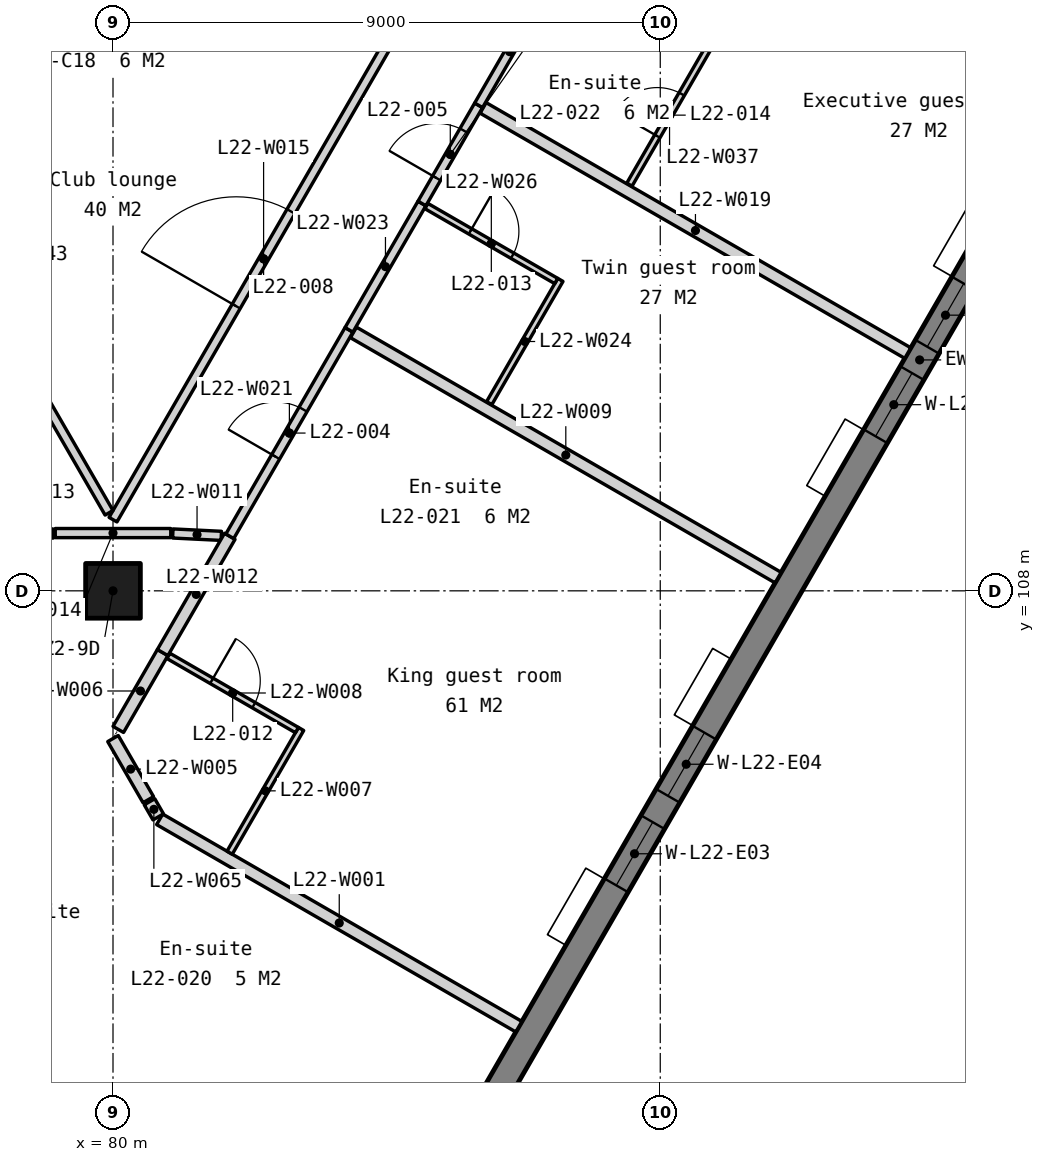
"""IFC4 building model, lengths in metres.
Left out: names, types, materials, properties, quantities, classifications, styles, units other than length and angle.
Written with IfcOpenShell. Run it as: python <this file> out.ifc"""

import sys

from ifc_helpers import new_model, si_unit, direction, frame, frame_2d, origin, origin_2d, place, context, subcontext, project, spatial, polyline, rectangle, outline, extrude, element, fill, save


model = new_model("IFC4")
c1 = context("Model", 3, precision=1e-05, world=origin(), true_north=direction((0.0, 1.0)))
c2 = subcontext(c1, "Body", "Model", "MODEL_VIEW")
j1 = project(units=[si_unit("LENGTHUNIT", "METRE"), si_unit("PLANEANGLEUNIT", "RADIAN")], contexts=[c1])
p1 = place(None, origin())
s1 = spatial("IfcSite", under=j1, at=p1, CompositionType="ELEMENT")
p2 = place(p1, origin())
s2 = spatial("IfcBuilding", under=s1, at=p2, CompositionType="ELEMENT")
p3 = place(p2, frame((0.0, 0.0, 92.3)))
s3 = spatial("IfcBuildingStorey", under=s2, at=p3, CompositionType="ELEMENT", Elevation=92.3)
p4 = place(p3, frame((80.0, 108.0, 0.0), z_axis=(0.0, 0.0, 1.0), x_axis=(1.0, 0.0, 0.0)))
e1 = element("IfcColumn", 1, at=p4, inside=s3, PredefinedType="COLUMN", context=c2, shape_type="SweptSolid", body=[
    extrude(rectangle(XDim=0.9, YDim=0.9, at=origin_2d()), origin(), (0.0, 0.0, 1.0), 3.5),
])
p5 = place(p3, frame((82.605, 93.333, -0.15), z_axis=(0.0, 0.0, 1.0), x_axis=(0.500000478905, 0.866025127289, 0.0)))
e2 = element("IfcWall", 2, at=p5, inside=s3, PredefinedType="SOLIDWALL", context=c2, shape_type="SweptSolid", body=[
    extrude(outline(polyline([(42.643, 0.0), (42.643, 3.5), (0.0, 3.5), (0.0, 0.0), (42.643, 0.0)])), frame((0.0, 0.225, 0.0), z_axis=(0.0, -1.0, 0.0), x_axis=(1.0, 0.0, 0.0)), (0.0, 0.0, 1.0), 0.45),
])
p6 = place(p5, frame((2.814, 0.0, 1.05)))
e3 = element("IfcOpeningElement", 3, at=p6, cuts=e2, PredefinedType="OPENING", context=c2, shape_type="SweptSolid", body=[
    extrude(rectangle(XDim=1.2, YDim=1.5, at=frame_2d((0.6, 0.75))), frame((0.0, 0.235, 0.0), z_axis=(0.0, -1.0, 0.0), x_axis=(1.0, 0.0, 0.0)), (0.0, 0.0, 1.0), 0.47),
])
p7 = place(p5, frame((4.514, 0.0, 1.05)))
e4 = element("IfcOpeningElement", 4, at=p7, cuts=e2, PredefinedType="OPENING", context=c2, shape_type="SweptSolid", body=[
    extrude(rectangle(XDim=1.2, YDim=1.5, at=frame_2d((0.6, 0.75))), frame((0.0, 0.235, 0.0), z_axis=(0.0, -1.0, 0.0), x_axis=(1.0, 0.0, 0.0)), (0.0, 0.0, 1.0), 0.47),
])
p8 = place(p5, frame((11.343, 0.0, 1.05)))
e5 = element("IfcOpeningElement", 5, at=p8, cuts=e2, PredefinedType="OPENING", context=c2, shape_type="SweptSolid", body=[
    extrude(rectangle(XDim=1.2, YDim=1.5, at=frame_2d((0.6, 0.75))), frame((0.0, 0.235, 0.0), z_axis=(0.0, -1.0, 0.0), x_axis=(1.0, 0.0, 0.0)), (0.0, 0.0, 1.0), 0.47),
])
p9 = place(p5, frame((13.043, 0.0, 1.05)))
e6 = element("IfcOpeningElement", 6, at=p9, cuts=e2, PredefinedType="OPENING", context=c2, shape_type="SweptSolid", body=[
    extrude(rectangle(XDim=1.2, YDim=1.5, at=frame_2d((0.6, 0.75))), frame((0.0, 0.235, 0.0), z_axis=(0.0, -1.0, 0.0), x_axis=(1.0, 0.0, 0.0)), (0.0, 0.0, 1.0), 0.47),
])
p10 = place(p5, frame((19.872, 0.0, 1.05)))
e7 = element("IfcOpeningElement", 7, at=p10, cuts=e2, PredefinedType="OPENING", context=c2, shape_type="SweptSolid", body=[
    extrude(rectangle(XDim=1.2, YDim=1.5, at=frame_2d((0.6, 0.75))), frame((0.0, 0.235, 0.0), z_axis=(0.0, -1.0, 0.0), x_axis=(1.0, 0.0, 0.0)), (0.0, 0.0, 1.0), 0.47),
])
p11 = place(p5, frame((21.572, 0.0, 1.05)))
e8 = element("IfcOpeningElement", 8, at=p11, cuts=e2, PredefinedType="OPENING", context=c2, shape_type="SweptSolid", body=[
    extrude(rectangle(XDim=1.2, YDim=1.5, at=frame_2d((0.6, 0.75))), frame((0.0, 0.235, 0.0), z_axis=(0.0, -1.0, 0.0), x_axis=(1.0, 0.0, 0.0)), (0.0, 0.0, 1.0), 0.47),
])
p12 = place(p5, frame((28.4, 0.0, 1.05)))
e9 = element("IfcOpeningElement", 9, at=p12, cuts=e2, PredefinedType="OPENING", context=c2, shape_type="SweptSolid", body=[
    extrude(rectangle(XDim=1.2, YDim=1.5, at=frame_2d((0.6, 0.75))), frame((0.0, 0.235, 0.0), z_axis=(0.0, -1.0, 0.0), x_axis=(1.0, 0.0, 0.0)), (0.0, 0.0, 1.0), 0.47),
])
p13 = place(p5, frame((30.1, 0.0, 1.05)))
e10 = element("IfcOpeningElement", 10, at=p13, cuts=e2, PredefinedType="OPENING", context=c2, shape_type="SweptSolid", body=[
    extrude(rectangle(XDim=1.2, YDim=1.5, at=frame_2d((0.6, 0.75))), frame((0.0, 0.235, 0.0), z_axis=(0.0, -1.0, 0.0), x_axis=(1.0, 0.0, 0.0)), (0.0, 0.0, 1.0), 0.47),
])
p14 = place(p5, frame((36.929, 0.0, 1.05)))
e11 = element("IfcOpeningElement", 11, at=p14, cuts=e2, PredefinedType="OPENING", context=c2, shape_type="SweptSolid", body=[
    extrude(rectangle(XDim=1.2, YDim=1.5, at=frame_2d((0.6, 0.75))), frame((0.0, 0.235, 0.0), z_axis=(0.0, -1.0, 0.0), x_axis=(1.0, 0.0, 0.0)), (0.0, 0.0, 1.0), 0.47),
])
p15 = place(p5, frame((38.629, 0.0, 1.05)))
e12 = element("IfcOpeningElement", 12, at=p15, cuts=e2, PredefinedType="OPENING", context=c2, shape_type="SweptSolid", body=[
    extrude(rectangle(XDim=1.2, YDim=1.5, at=frame_2d((0.6, 0.75))), frame((0.0, 0.235, 0.0), z_axis=(0.0, -1.0, 0.0), x_axis=(1.0, 0.0, 0.0)), (0.0, 0.0, 1.0), 0.47),
])
p16 = place(p3, frame((80.767, 104.242, 0.0), z_axis=(0.0, 0.0, 1.0), x_axis=(0.866027642648, -0.499996122155, 0.0)))
e13 = element("IfcWall", 13, at=p16, inside=s3, PredefinedType="PARTITIONING", context=c2, shape_type="SweptSolid", body=[
    extrude(rectangle(XDim=6.821, YDim=0.2, at=frame_2d((3.411, 0.0))), origin(), (0.0, 0.0, 1.0), 3.35),
])
p17 = place(p3, frame((80.0, 105.571, 0.0), z_axis=(0.0, 0.0, 1.0), x_axis=(0.499916648857, -0.866073521242, 0.0)))
e14 = element("IfcWall", 14, at=p17, inside=s3, PredefinedType="PARTITIONING", context=c2, shape_type="SweptSolid", body=[
    extrude(rectangle(XDim=1.161, YDim=0.2, at=frame_2d((0.581, 0.0))), origin(), (0.0, 0.0, 1.0), 3.35),
])
p18 = place(p3, frame((80.087, 105.72, 0.0), z_axis=(0.0, 0.0, 1.0), x_axis=(0.499934806282, 0.866063040123, 0.0)))
e15 = element("IfcWall", 15, at=p18, inside=s3, PredefinedType="PARTITIONING", context=c2, shape_type="SweptSolid", body=[
    extrude(rectangle(XDim=1.46, YDim=0.2, at=frame_2d((0.73, 0.0))), origin(), (0.0, 0.0, 1.0), 3.35),
])
p19 = place(p3, frame((81.918, 103.693, 0.0), z_axis=(0.0, 0.0, 1.0), x_axis=(0.500016218704, 0.866016039709, 0.0)))
e16 = element("IfcWall", 16, at=p19, inside=s3, PredefinedType="PARTITIONING", context=c2, shape_type="SweptSolid", body=[
    extrude(rectangle(XDim=2.35, YDim=0.1, at=frame_2d((1.175, 0.0))), origin(), (0.0, 0.0, 1.0), 3.35),
])
p20 = place(p3, frame((80.912, 106.93, 0.0), z_axis=(0.0, 0.0, 1.0), x_axis=(0.866023955769, -0.500002508028, 0.0)))
e17 = element("IfcWall", 17, at=p20, inside=s3, PredefinedType="PARTITIONING", context=c2, shape_type="SweptSolid", body=[
    extrude(rectangle(XDim=2.44, YDim=0.1, at=frame_2d((1.22, 0.0))), origin(), (0.0, 0.0, 1.0), 3.35),
])
p21 = place(p20, frame((0.82, 0.0, 0.0)))
e18 = element("IfcOpeningElement", 18, at=p21, cuts=e17, PredefinedType="OPENING", context=c2, shape_type="SweptSolid", body=[
    extrude(rectangle(XDim=0.8, YDim=2.1, at=frame_2d((0.4, 1.05))), frame((0.0, 0.06, 0.0), z_axis=(0.0, -1.0, 0.0), x_axis=(1.0, 0.0, 0.0)), (0.0, 0.0, 1.0), 0.12),
])
p22 = place(p3, frame((83.954, 112.25, 0.0), z_axis=(0.0, 0.0, 1.0), x_axis=(0.866030828432, -0.499990604118, 0.0)))
e19 = element("IfcWall", 19, at=p22, inside=s3, PredefinedType="PARTITIONING", context=c2, shape_type="SweptSolid", body=[
    extrude(rectangle(XDim=8.065, YDim=0.2, at=frame_2d((4.033, 0.0))), origin(), (0.0, 0.0, 1.0), 3.35),
])
p23 = place(p3, frame((80.983, 108.943, 0.0), z_axis=(0.0, 0.0, 1.0), x_axis=(0.998802165703, -0.048930908301, 0.0)))
e20 = element("IfcWall", 20, at=p23, inside=s3, PredefinedType="PARTITIONING", context=c2, shape_type="SweptSolid", body=[
    extrude(rectangle(XDim=0.798, YDim=0.15, at=frame_2d((0.399, 0.0))), origin(), (0.0, 0.0, 1.0), 3.35),
])
p24 = place(p3, frame((80.816, 106.985, 0.0), z_axis=(0.0, 0.0, 1.0), x_axis=(0.500003149848, 0.866023585211, 0.0)))
e21 = element("IfcWall", 21, at=p24, inside=s3, PredefinedType="PARTITIONING", context=c2, shape_type="SweptSolid", body=[
    extrude(rectangle(XDim=2.208, YDim=0.2, at=frame_2d((1.104, 0.0))), origin(), (0.0, 0.0, 1.0), 3.35),
])
p25 = place(p3, frame((78.202, 108.903, 0.0), z_axis=(0.0, 0.0, 1.0), x_axis=(0.998794521593, 0.049086695098, 0.0)))
e22 = element("IfcWall", 22, at=p25, inside=s3, PredefinedType="PARTITIONING", context=c2, shape_type="SweptSolid", body=[
    extrude(rectangle(XDim=0.816, YDim=0.15, at=frame_2d((0.408, 0.0))), origin(), (0.0, 0.0, 1.0), 3.35),
])
p26 = place(p3, frame((79.05, 108.95, 0.0), z_axis=(0.0, 0.0, 1.0), x_axis=(1.0, 0.0, 0.0)))
e23 = element("IfcWall", 23, at=p26, inside=s3, PredefinedType="PARTITIONING", context=c2, shape_type="SweptSolid", body=[
    extrude(rectangle(XDim=1.9, YDim=0.15, at=frame_2d((0.95, 0.0))), origin(), (0.0, 0.0, 1.0), 3.35),
])
p27 = place(p3, frame((80.0, 109.17, 0.0), z_axis=(0.0, 0.0, 1.0), x_axis=(0.499995505729, 0.866027998537, 0.0)))
e24 = element("IfcWall", 24, at=p27, inside=s3, PredefinedType="PARTITIONING", context=c2, shape_type="SweptSolid", body=[
    extrude(rectangle(XDim=9.907, YDim=0.15, at=frame_2d((4.953, 0.0))), origin(), (0.0, 0.0, 1.0), 3.35),
])
p28 = place(p27, frame((4.053, 0.0, 0.0)))
e25 = element("IfcOpeningElement", 25, at=p28, cuts=e24, PredefinedType="OPENING", context=c2, shape_type="SweptSolid", body=[
    extrude(rectangle(XDim=1.8, YDim=2.1, at=frame_2d((0.9, 1.05))), frame((0.0, 0.085, 0.0), z_axis=(0.0, -1.0, 0.0), x_axis=(1.0, 0.0, 0.0)), (0.0, 0.0, 1.0), 0.17),
])
p29 = place(p3, frame((86.087, 115.943, 0.0), z_axis=(0.0, 0.0, 1.0), x_axis=(0.866010152247, -0.500026415507, 0.0)))
e26 = element("IfcWall", 26, at=p29, inside=s3, PredefinedType="PARTITIONING", context=c2, shape_type="SweptSolid", body=[
    extrude(rectangle(XDim=8.065, YDim=0.2, at=frame_2d((4.032, 0.0))), origin(), (0.0, 0.0, 1.0), 3.35),
])
p30 = place(p3, frame((81.921, 108.897, 0.0), z_axis=(0.0, 0.0, 1.0), x_axis=(0.500017148795, 0.866015502696, 0.0)))
e27 = element("IfcWall", 27, at=p30, inside=s3, PredefinedType="PARTITIONING", context=c2, shape_type="SweptSolid", body=[
    extrude(rectangle(XDim=3.92, YDim=0.15, at=frame_2d((1.96, 0.0))), origin(), (0.0, 0.0, 1.0), 3.35),
])
p31 = place(p30, frame((1.51, 0.0, 0.0)))
e28 = element("IfcOpeningElement", 28, at=p31, cuts=e27, PredefinedType="OPENING", context=c2, shape_type="SweptSolid", body=[
    extrude(rectangle(XDim=0.9, YDim=2.1, at=frame_2d((0.45, 1.05))), frame((0.0, 0.085, 0.0), z_axis=(0.0, -1.0, 0.0), x_axis=(1.0, 0.0, 0.0)), (0.0, 0.0, 1.0), 0.17),
])
p32 = place(p3, frame((83.881, 112.292, 0.0), z_axis=(0.0, 0.0, 1.0), x_axis=(0.500001309137, 0.866024647952, 0.0)))
e29 = element("IfcWall", 29, at=p32, inside=s3, PredefinedType="PARTITIONING", context=c2, shape_type="SweptSolid", body=[
    extrude(rectangle(XDim=2.4, YDim=0.15, at=frame_2d((1.2, 0.0))), origin(), (0.0, 0.0, 1.0), 3.35),
])
p33 = place(p3, frame((86.188, 111.088, 0.0), z_axis=(0.0, 0.0, 1.0), x_axis=(0.499999433879, 0.866025730634, 0.0)))
e30 = element("IfcWall", 30, at=p33, inside=s3, PredefinedType="PARTITIONING", context=c2, shape_type="SweptSolid", body=[
    extrude(rectangle(XDim=2.34, YDim=0.1, at=frame_2d((1.17, 0.0))), origin(), (0.0, 0.0, 1.0), 3.35),
])
p34 = place(p3, frame((85.154, 114.328, 0.0), z_axis=(0.0, 0.0, 1.0), x_axis=(0.866040446274, -0.499973944738, 0.0)))
e31 = element("IfcWall", 31, at=p34, inside=s3, PredefinedType="PARTITIONING", context=c2, shape_type="SweptSolid", body=[
    extrude(rectangle(XDim=2.465, YDim=0.1, at=frame_2d((1.232, 0.0))), origin(), (0.0, 0.0, 1.0), 3.35),
])
p35 = place(p34, frame((0.833, 0.0, 0.0)))
e32 = element("IfcOpeningElement", 32, at=p35, cuts=e31, PredefinedType="OPENING", context=c2, shape_type="SweptSolid", body=[
    extrude(rectangle(XDim=0.8, YDim=2.1, at=frame_2d((0.4, 1.05))), frame((0.0, 0.06, 0.0), z_axis=(0.0, -1.0, 0.0), x_axis=(1.0, 0.0, 0.0)), (0.0, 0.0, 1.0), 0.12),
])
p36 = place(p3, frame((85.081, 114.371, 0.0), z_axis=(0.0, 0.0, 1.0), x_axis=(0.499941596792, 0.866059120267, 0.0)))
e33 = element("IfcWall", 33, at=p36, inside=s3, PredefinedType="PARTITIONING", context=c2, shape_type="SweptSolid", body=[
    extrude(rectangle(XDim=1.865, YDim=0.15, at=frame_2d((0.932, 0.0))), origin(), (0.0, 0.0, 1.0), 3.35),
])
p37 = place(p36, frame((0.482, 0.0, 0.0)))
e34 = element("IfcOpeningElement", 34, at=p37, cuts=e33, PredefinedType="OPENING", context=c2, shape_type="SweptSolid", body=[
    extrude(rectangle(XDim=0.9, YDim=2.1, at=frame_2d((0.45, 1.05))), frame((0.0, 0.085, 0.0), z_axis=(0.0, -1.0, 0.0), x_axis=(1.0, 0.0, 0.0)), (0.0, 0.0, 1.0), 0.17),
])
p38 = place(p3, frame((86.013, 115.985, 0.0), z_axis=(0.0, 0.0, 1.0), x_axis=(0.499992114976, 0.866029956157, 0.0)))
e35 = element("IfcWall", 35, at=p38, inside=s3, PredefinedType="PARTITIONING", context=c2, shape_type="SweptSolid", body=[
    extrude(rectangle(XDim=2.038, YDim=0.15, at=frame_2d((1.019, 0.0))), origin(), (0.0, 0.0, 1.0), 3.35),
])
p39 = place(p3, frame((88.493, 114.68, 0.0), z_axis=(0.0, 0.0, 1.0), x_axis=(0.499938597367, 0.866060851709, 0.0)))
e36 = element("IfcWall", 36, at=p39, inside=s3, PredefinedType="PARTITIONING", context=c2, shape_type="SweptSolid", body=[
    extrude(rectangle(XDim=2.64, YDim=0.1, at=frame_2d((1.32, 0.0))), origin(), (0.0, 0.0, 1.0), 3.35),
])
p40 = place(p39, frame((0.92, 0.0, 0.0)))
e37 = element("IfcOpeningElement", 37, at=p40, cuts=e36, PredefinedType="OPENING", context=c2, shape_type="SweptSolid", body=[
    extrude(rectangle(XDim=0.8, YDim=2.1, at=frame_2d((0.4, 1.05))), frame((0.0, 0.06, 0.0), z_axis=(0.0, -1.0, 0.0), x_axis=(1.0, 0.0, 0.0)), (0.0, 0.0, 1.0), 0.12),
])
p41 = place(p3, frame((75.047, 117.75, 0.0), z_axis=(0.0, 0.0, 1.0), x_axis=(0.49999841397, -0.866026319477, 0.0)))
e38 = element("IfcWall", 38, at=p41, inside=s3, PredefinedType="PARTITIONING", context=c2, shape_type="SweptSolid", body=[
    extrude(rectangle(XDim=9.777, YDim=0.15, at=frame_2d((4.888, 0.0))), origin(), (0.0, 0.0, 1.0), 3.35),
])
p42 = place(p3, frame((80.6, 104.531, 0.0), z_axis=(0.0, 0.0, 1.0), x_axis=(0.500164219654, -0.865930570761, 0.0)))
e39 = element("IfcWall", 39, at=p42, inside=s3, PredefinedType="PARTITIONING", context=c2, shape_type="SweptSolid", body=[
    extrude(rectangle(XDim=0.287, YDim=0.2, at=frame_2d((0.144, 0.0))), origin(), (0.0, 0.0, 1.0), 3.35),
])
p43 = place(p8, origin())
e40 = element("IfcWindow", 40, at=p43, inside=s3, PartitioningType="SINGLE_PANEL", PredefinedType="WINDOW", context=c2, shape_type="SweptSolid", body=[
    extrude(rectangle(XDim=1.2, YDim=1.5, at=frame_2d((0.6, 0.75))), frame((0.0, 0.03, 0.0), z_axis=(0.0, -1.0, 0.0), x_axis=(1.0, 0.0, 0.0)), (0.0, 0.0, 1.0), 0.06),
])
fill(e5, e40)
p44 = place(p9, origin())
e41 = element("IfcWindow", 41, at=p44, inside=s3, PartitioningType="SINGLE_PANEL", PredefinedType="WINDOW", context=c2, shape_type="SweptSolid", body=[
    extrude(rectangle(XDim=1.2, YDim=1.5, at=frame_2d((0.6, 0.75))), frame((0.0, 0.03, 0.0), z_axis=(0.0, -1.0, 0.0), x_axis=(1.0, 0.0, 0.0)), (0.0, 0.0, 1.0), 0.06),
])
fill(e6, e41)
p45 = place(p10, origin())
e42 = element("IfcWindow", 42, at=p45, inside=s3, PartitioningType="SINGLE_PANEL", PredefinedType="WINDOW", context=c2, shape_type="SweptSolid", body=[
    extrude(rectangle(XDim=1.2, YDim=1.5, at=frame_2d((0.6, 0.75))), frame((0.0, 0.03, 0.0), z_axis=(0.0, -1.0, 0.0), x_axis=(1.0, 0.0, 0.0)), (0.0, 0.0, 1.0), 0.06),
])
fill(e7, e42)
p46 = place(p11, origin())
e43 = element("IfcWindow", 43, at=p46, inside=s3, PartitioningType="SINGLE_PANEL", PredefinedType="WINDOW", context=c2, shape_type="SweptSolid", body=[
    extrude(rectangle(XDim=1.2, YDim=1.5, at=frame_2d((0.6, 0.75))), frame((0.0, 0.03, 0.0), z_axis=(0.0, -1.0, 0.0), x_axis=(1.0, 0.0, 0.0)), (0.0, 0.0, 1.0), 0.06),
])
fill(e8, e43)
p47 = place(p31, origin())
e44 = element("IfcDoor", 44, at=p47, inside=s3, OperationType="SINGLE_SWING_LEFT", PredefinedType="DOOR", context=c2, shape_type="SweptSolid", body=[
    extrude(rectangle(XDim=0.9, YDim=2.1, at=frame_2d((0.45, 1.05))), frame((0.0, 0.025, 0.0), z_axis=(0.0, -1.0, 0.0), x_axis=(1.0, 0.0, 0.0)), (0.0, 0.0, 1.0), 0.05),
])
fill(e28, e44)
p48 = place(p37, origin())
e45 = element("IfcDoor", 45, at=p48, inside=s3, OperationType="SINGLE_SWING_LEFT", PredefinedType="DOOR", context=c2, shape_type="SweptSolid", body=[
    extrude(rectangle(XDim=0.9, YDim=2.1, at=frame_2d((0.45, 1.05))), frame((0.0, 0.025, 0.0), z_axis=(0.0, -1.0, 0.0), x_axis=(1.0, 0.0, 0.0)), (0.0, 0.0, 1.0), 0.05),
])
fill(e34, e45)
p49 = place(p28, origin())
e46 = element("IfcDoor", 46, at=p49, inside=s3, OperationType="SINGLE_SWING_LEFT", PredefinedType="DOOR", context=c2, shape_type="SweptSolid", body=[
    extrude(rectangle(XDim=1.8, YDim=2.1, at=frame_2d((0.9, 1.05))), frame((0.0, 0.025, 0.0), z_axis=(0.0, -1.0, 0.0), x_axis=(1.0, 0.0, 0.0)), (0.0, 0.0, 1.0), 0.05),
])
fill(e25, e46)
p50 = place(p21, origin())
e47 = element("IfcDoor", 47, at=p50, inside=s3, OperationType="SINGLE_SWING_LEFT", PredefinedType="DOOR", context=c2, shape_type="SweptSolid", body=[
    extrude(rectangle(XDim=0.8, YDim=2.1, at=frame_2d((0.4, 1.05))), frame((0.0, 0.025, 0.0), z_axis=(0.0, -1.0, 0.0), x_axis=(1.0, 0.0, 0.0)), (0.0, 0.0, 1.0), 0.05),
])
fill(e18, e47)
p51 = place(p35, origin())
e48 = element("IfcDoor", 48, at=p51, inside=s3, OperationType="SINGLE_SWING_LEFT", PredefinedType="DOOR", context=c2, shape_type="SweptSolid", body=[
    extrude(rectangle(XDim=0.8, YDim=2.1, at=frame_2d((0.4, 1.05))), frame((0.0, 0.025, 0.0), z_axis=(0.0, -1.0, 0.0), x_axis=(1.0, 0.0, 0.0)), (0.0, 0.0, 1.0), 0.05),
])
fill(e32, e48)
p52 = place(p40, origin())
e49 = element("IfcDoor", 49, at=p52, inside=s3, OperationType="SINGLE_SWING_LEFT", PredefinedType="DOOR", context=c2, shape_type="SweptSolid", body=[
    extrude(rectangle(XDim=0.8, YDim=2.1, at=frame_2d((0.4, 1.05))), frame((0.0, 0.025, 0.0), z_axis=(0.0, -1.0, 0.0), x_axis=(1.0, 0.0, 0.0)), (0.0, 0.0, 1.0), 0.05),
])
fill(e37, e49)
save(model, sys.argv[1])
